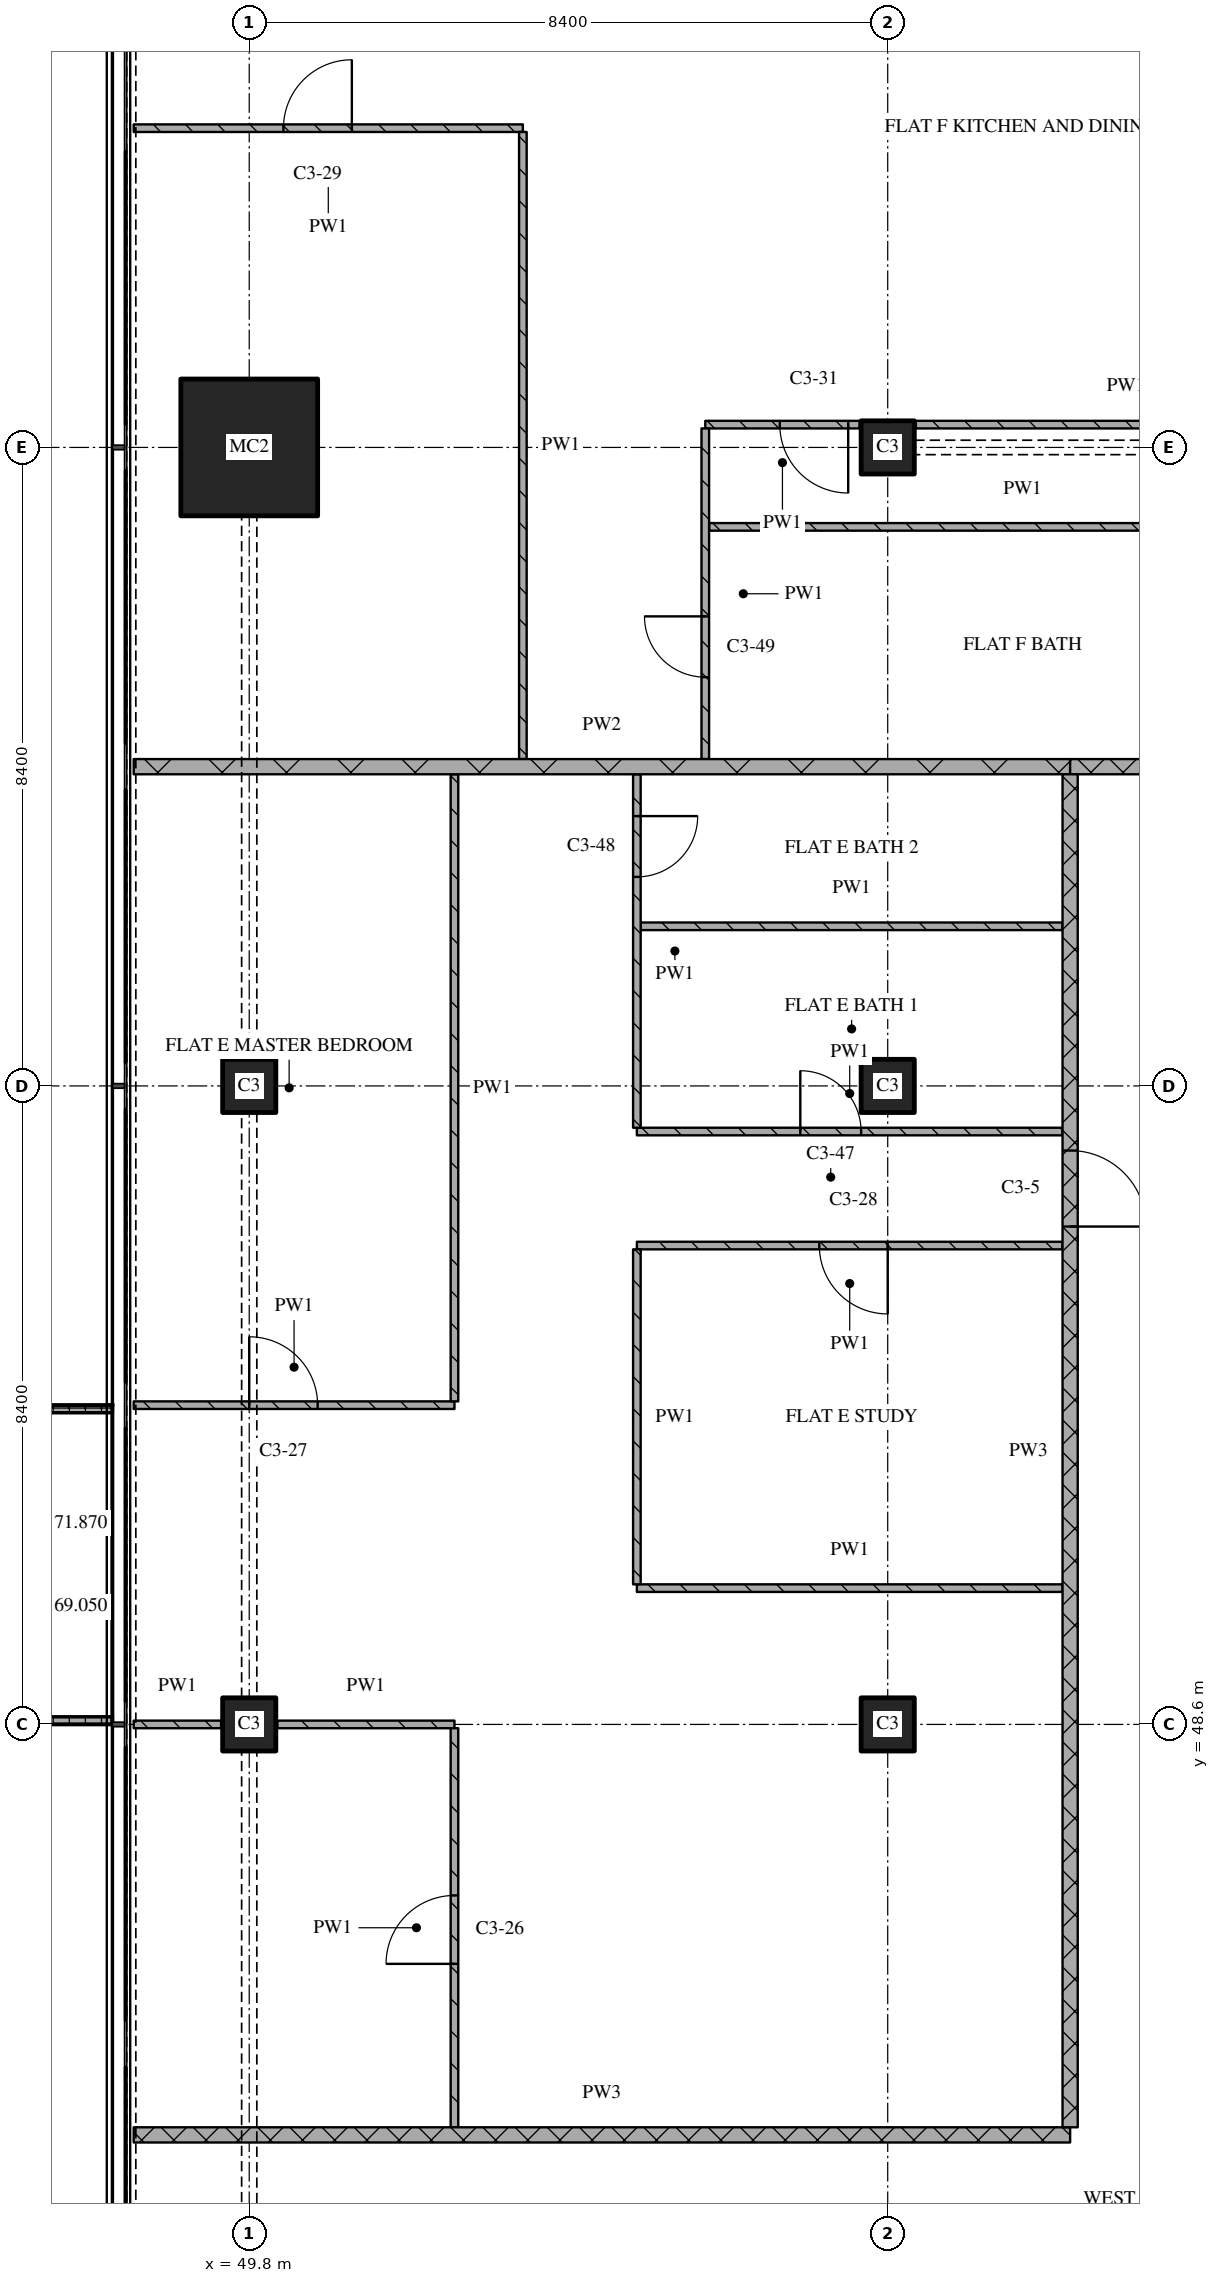
"""IFC4 building model, lengths in metres.
Left out: names, types, materials, properties, quantities, classifications, styles, units other than length and angle.
Written with IfcOpenShell. Run it as: python <this file> out.ifc"""

import sys

from ifc_helpers import new_model, si_unit, direction, frame, frame_2d, origin, origin_2d, place, context, subcontext, project, spatial, polyline, rectangle, outline, extrude, element, fill, save


model = new_model("IFC4")
c1 = context("Model", 3, precision=1e-05, world=origin(), true_north=direction((0.0, 1.0)))
c2 = subcontext(c1, "Body", "Model", "MODEL_VIEW")
j1 = project(units=[si_unit("LENGTHUNIT", "METRE"), si_unit("PLANEANGLEUNIT", "RADIAN")], contexts=[c1])
p1 = place(None, origin())
s1 = spatial("IfcSite", under=j1, at=p1, CompositionType="ELEMENT")
p2 = place(p1, origin())
s2 = spatial("IfcBuilding", under=s1, at=p2, CompositionType="ELEMENT")
p3 = place(p2, frame((0.0, 0.0, 169.05)))
s3 = spatial("IfcBuildingStorey", under=s2, at=p3, CompositionType="ELEMENT", Elevation=169.05)
for number, where, z_axis, x_axis in (
    (1, (49.8, 48.6, 0.0), (0.0, 0.0, 1.0), (1.0, 0.0, 0.0)),
    (2, (49.8, 57.0, 0.0), (0.0, 0.0, 1.0), (1.0, 0.0, 0.0)),
):
    element("IfcColumn", number, at=place(p3, frame(where, z_axis=z_axis, x_axis=x_axis)), inside=s3, PredefinedType="COLUMN", context=c2, shape_type="SweptSolid", body=[
        extrude(rectangle(XDim=0.7, YDim=0.7, at=origin_2d()), origin(), (0.0, 0.0, 1.0), 3.6),
    ])
p4 = place(p3, frame((49.8, 65.4, 0.0), z_axis=(0.0, 0.0, 1.0), x_axis=(1.0, 0.0, 0.0)))
e3 = element("IfcColumn", 3, at=p4, inside=s3, PredefinedType="COLUMN", context=c2, shape_type="SweptSolid", body=[
    extrude(rectangle(XDim=1.8, YDim=1.8, at=origin_2d()), origin(), (0.0, 0.0, 1.0), 3.6),
])
for number, where, z_axis, x_axis in (
    (4, (58.2, 48.6, 0.0), (0.0, 0.0, 1.0), (1.0, 0.0, 0.0)),
    (5, (58.2, 57.0, 0.0), (0.0, 0.0, 1.0), (1.0, 0.0, 0.0)),
    (6, (58.2, 65.4, 0.0), (0.0, 0.0, 1.0), (1.0, 0.0, 0.0)),
):
    element("IfcColumn", number, at=place(p3, frame(where, z_axis=z_axis, x_axis=x_axis)), inside=s3, PredefinedType="COLUMN", context=c2, shape_type="SweptSolid", body=[
        extrude(rectangle(XDim=0.7, YDim=0.7, at=origin_2d()), origin(), (0.0, 0.0, 1.0), 3.6),
    ])
p5 = place(p3, origin())
e7 = element("IfcWall", 7, at=p5, inside=s3, PredefinedType="SOLIDWALL", context=c2, shape_type="SweptSolid", body=[
    extrude(outline(polyline([(48.0, 52.8), (48.0, 52.7), (46.367, 52.7), (46.367, 48.7), (48.0, 48.7), (48.0, 48.6), (46.267, 48.6), (46.267, 52.8), (48.0, 52.8)])), origin(), (0.0, 0.0, 1.0), 1.0),
])
p6 = place(p3, frame((48.28, 43.2, 0.0), z_axis=(0.0, 0.0, 1.0), x_axis=(1.0, 0.0, 0.0)))
e8 = element("IfcWall", 8, at=p6, inside=s3, PredefinedType="PARTITIONING", context=c2, shape_type="SweptSolid", body=[
    extrude(rectangle(XDim=12.32, YDim=0.2, at=frame_2d((6.16, 0.0))), origin(), (0.0, 0.0, 1.0), 3.32),
])
p7 = place(p3, frame((48.28, 48.6, 0.0), z_axis=(0.0, 0.0, 1.0), x_axis=(1.0, 0.0, 0.0)))
e9 = element("IfcWall", 9, at=p7, inside=s3, PredefinedType="PARTITIONING", context=c2, shape_type="SweptSolid", body=[
    extrude(rectangle(XDim=1.15, YDim=0.1, at=frame_2d((0.575, 0.0))), origin(), (0.0, 0.0, 1.0), 3.32),
])
p8 = place(p3, frame((50.17, 48.6, 0.0), z_axis=(0.0, 0.0, 1.0), x_axis=(1.0, 0.0, 0.0)))
e10 = element("IfcWall", 10, at=p8, inside=s3, PredefinedType="PARTITIONING", context=c2, shape_type="SweptSolid", body=[
    extrude(rectangle(XDim=2.33, YDim=0.1, at=frame_2d((1.165, 0.0))), origin(), (0.0, 0.0, 1.0), 3.32),
])
p9 = place(p3, frame((54.9, 50.393, 0.0), z_axis=(0.0, 0.0, 1.0), x_axis=(1.0, 0.0, 0.0)))
e11 = element("IfcWall", 11, at=p9, inside=s3, PredefinedType="PARTITIONING", context=c2, shape_type="SweptSolid", body=[
    extrude(rectangle(XDim=5.6, YDim=0.1, at=frame_2d((2.8, 0.0))), origin(), (0.0, 0.0, 1.0), 3.32),
])
p10 = place(p3, frame((48.28, 52.8, 0.0), z_axis=(0.0, 0.0, 1.0), x_axis=(1.0, 0.0, 0.0)))
e12 = element("IfcWall", 12, at=p10, inside=s3, PredefinedType="PARTITIONING", context=c2, shape_type="SweptSolid", body=[
    extrude(rectangle(XDim=4.22, YDim=0.1, at=frame_2d((2.11, 0.0))), origin(), (0.0, 0.0, 1.0), 3.32),
])
p11 = place(p10, frame((1.52, 0.0, 0.0)))
e13 = element("IfcOpeningElement", 13, at=p11, cuts=e12, PredefinedType="OPENING", context=c2, shape_type="SweptSolid", body=[
    extrude(rectangle(XDim=0.9, YDim=2.1, at=frame_2d((0.45, 1.05))), frame((0.0, 0.06, 0.0), z_axis=(0.0, -1.0, 0.0), x_axis=(1.0, 0.0, 0.0)), (0.0, 0.0, 1.0), 0.12),
])
p12 = place(p3, frame((60.5, 54.9, 0.0), z_axis=(0.0, 0.0, 1.0), x_axis=(-1.0, 0.0, 0.0)))
e14 = element("IfcWall", 14, at=p12, inside=s3, PredefinedType="PARTITIONING", context=c2, shape_type="SweptSolid", body=[
    extrude(rectangle(XDim=5.6, YDim=0.1, at=frame_2d((2.8, 0.0))), origin(), (0.0, 0.0, 1.0), 3.32),
])
p13 = place(p12, frame((2.3, 0.0, 0.0)))
e15 = element("IfcOpeningElement", 15, at=p13, cuts=e14, PredefinedType="OPENING", context=c2, shape_type="SweptSolid", body=[
    extrude(rectangle(XDim=0.9, YDim=2.1, at=frame_2d((0.45, 1.05))), frame((0.0, 0.06, 0.0), z_axis=(0.0, -1.0, 0.0), x_axis=(1.0, 0.0, 0.0)), (0.0, 0.0, 1.0), 0.12),
])
p14 = place(p3, frame((54.9, 56.4, 0.0), z_axis=(0.0, 0.0, 1.0), x_axis=(1.0, 0.0, 0.0)))
e16 = element("IfcWall", 16, at=p14, inside=s3, PredefinedType="PARTITIONING", context=c2, shape_type="SweptSolid", body=[
    extrude(rectangle(XDim=5.6, YDim=0.1, at=frame_2d((2.8, 0.0))), origin(), (0.0, 0.0, 1.0), 3.32),
])
p15 = place(p14, frame((2.15, 0.0, 0.0)))
e17 = element("IfcOpeningElement", 17, at=p15, cuts=e16, PredefinedType="OPENING", context=c2, shape_type="SweptSolid", body=[
    extrude(rectangle(XDim=0.8, YDim=2.1, at=frame_2d((0.4, 1.05))), frame((0.0, 0.06, 0.0), z_axis=(0.0, -1.0, 0.0), x_axis=(1.0, 0.0, 0.0)), (0.0, 0.0, 1.0), 0.12),
])
p16 = place(p3, frame((54.95, 59.1, 0.0), z_axis=(0.0, 0.0, 1.0), x_axis=(1.0, 0.0, 0.0)))
e18 = element("IfcWall", 18, at=p16, inside=s3, PredefinedType="PARTITIONING", context=c2, shape_type="SweptSolid", body=[
    extrude(rectangle(XDim=5.55, YDim=0.1, at=frame_2d((2.775, 0.0))), origin(), (0.0, 0.0, 1.0), 3.32),
])
p17 = place(p3, frame((60.6, 61.2, 0.0), z_axis=(0.0, 0.0, 1.0), x_axis=(1.0, 0.0, 0.0)))
e19 = element("IfcWall", 19, at=p17, inside=s3, PredefinedType="PARTITIONING", context=c2, shape_type="SweptSolid", body=[
    extrude(rectangle(XDim=3.6, YDim=0.2, at=frame_2d((1.8, 0.0))), origin(), (0.0, 0.0, 1.0), 3.32),
])
p18 = place(p3, frame((48.28, 61.2, 0.0), z_axis=(0.0, 0.0, 1.0), x_axis=(1.0, 0.0, 0.0)))
e20 = element("IfcWall", 20, at=p18, inside=s3, PredefinedType="PARTITIONING", context=c2, shape_type="SweptSolid", body=[
    extrude(rectangle(XDim=12.32, YDim=0.2, at=frame_2d((6.16, 0.0))), origin(), (0.0, 0.0, 1.0), 3.32),
])
p19 = place(p3, frame((55.85, 64.355, 0.0), z_axis=(0.0, 0.0, 1.0), x_axis=(1.0, 0.0, 0.0)))
e21 = element("IfcWall", 21, at=p19, inside=s3, PredefinedType="PARTITIONING", context=c2, shape_type="SweptSolid", body=[
    extrude(rectangle(XDim=8.25, YDim=0.1, at=frame_2d((4.125, 0.0))), origin(), (0.0, 0.0, 1.0), 3.32),
])
p20 = place(p3, frame((57.83, 65.7, 0.0), z_axis=(0.0, 0.0, 1.0), x_axis=(-1.0, 0.0, 0.0)))
e22 = element("IfcWall", 22, at=p20, inside=s3, PredefinedType="PARTITIONING", context=c2, shape_type="SweptSolid", body=[
    extrude(rectangle(XDim=2.03, YDim=0.1, at=frame_2d((1.015, 0.0))), origin(), (0.0, 0.0, 1.0), 3.32),
])
p21 = place(p20, frame((0.15, 0.0, 0.0)))
e23 = element("IfcOpeningElement", 23, at=p21, cuts=e22, PredefinedType="OPENING", context=c2, shape_type="SweptSolid", body=[
    extrude(rectangle(XDim=0.9, YDim=2.1, at=frame_2d((0.45, 1.05))), frame((0.0, 0.06, 0.0), z_axis=(0.0, -1.0, 0.0), x_axis=(1.0, 0.0, 0.0)), (0.0, 0.0, 1.0), 0.12),
])
p22 = place(p3, frame((58.57, 65.7, 0.0), z_axis=(0.0, 0.0, 1.0), x_axis=(1.0, 0.0, 0.0)))
e24 = element("IfcWall", 24, at=p22, inside=s3, PredefinedType="PARTITIONING", context=c2, shape_type="SweptSolid", body=[
    extrude(rectangle(XDim=5.53, YDim=0.1, at=frame_2d((2.765, 0.0))), origin(), (0.0, 0.0, 1.0), 3.32),
])
p23 = place(p3, frame((53.4, 69.6, 0.0), z_axis=(0.0, 0.0, 1.0), x_axis=(-1.0, 0.0, 0.0)))
e25 = element("IfcWall", 25, at=p23, inside=s3, PredefinedType="PARTITIONING", context=c2, shape_type="SweptSolid", body=[
    extrude(rectangle(XDim=5.12, YDim=0.1, at=frame_2d((2.56, 0.0))), origin(), (0.0, 0.0, 1.0), 3.32),
])
p24 = place(p23, frame((2.25, 0.0, 0.0)))
e26 = element("IfcOpeningElement", 26, at=p24, cuts=e25, PredefinedType="OPENING", context=c2, shape_type="SweptSolid", body=[
    extrude(rectangle(XDim=0.9, YDim=2.1, at=frame_2d((0.45, 1.05))), frame((0.0, 0.06, 0.0), z_axis=(0.0, -1.0, 0.0), x_axis=(1.0, 0.0, 0.0)), (0.0, 0.0, 1.0), 0.12),
])
p25 = place(p3, frame((52.5, 43.3, 0.0), z_axis=(0.0, 0.0, 1.0), x_axis=(0.0, 1.0, 0.0)))
e27 = element("IfcWall", 27, at=p25, inside=s3, PredefinedType="PARTITIONING", context=c2, shape_type="SweptSolid", body=[
    extrude(rectangle(XDim=5.25, YDim=0.1, at=frame_2d((2.625, 0.0))), origin(), (0.0, 0.0, 1.0), 3.32),
])
p26 = place(p25, frame((2.15, 0.0, 0.0)))
e28 = element("IfcOpeningElement", 28, at=p26, cuts=e27, PredefinedType="OPENING", context=c2, shape_type="SweptSolid", body=[
    extrude(rectangle(XDim=0.9, YDim=2.1, at=frame_2d((0.45, 1.05))), frame((0.0, 0.06, 0.0), z_axis=(0.0, -1.0, 0.0), x_axis=(1.0, 0.0, 0.0)), (0.0, 0.0, 1.0), 0.12),
])
for number, where, z_axis, x_axis in (
    (29, (52.5, 61.1, 0.0), (0.0, 0.0, 1.0), (0.0, -1.0, 0.0)),
    (30, (53.4, 69.55, 0.0), (0.0, 0.0, 1.0), (0.0, -1.0, 0.0)),
):
    element("IfcWall", number, at=place(p3, frame(where, z_axis=z_axis, x_axis=x_axis)), inside=s3, PredefinedType="PARTITIONING", context=c2, shape_type="SweptSolid", body=[
        extrude(rectangle(XDim=8.25, YDim=0.1, at=frame_2d((4.125, 0.0))), origin(), (0.0, 0.0, 1.0), 3.32),
    ])
p27 = place(p3, frame((54.9, 54.85, 0.0), z_axis=(0.0, 0.0, 1.0), x_axis=(0.0, -1.0, 0.0)))
e31 = element("IfcWall", 31, at=p27, inside=s3, PredefinedType="PARTITIONING", context=c2, shape_type="SweptSolid", body=[
    extrude(rectangle(XDim=4.407, YDim=0.1, at=frame_2d((2.204, 0.0))), origin(), (0.0, 0.0, 1.0), 3.32),
])
p28 = place(p3, frame((54.9, 61.1, 0.0), z_axis=(0.0, 0.0, 1.0), x_axis=(0.0, -1.0, 0.0)))
e32 = element("IfcWall", 32, at=p28, inside=s3, PredefinedType="PARTITIONING", context=c2, shape_type="SweptSolid", body=[
    extrude(rectangle(XDim=4.65, YDim=0.1, at=frame_2d((2.325, 0.0))), origin(), (0.0, 0.0, 1.0), 3.32),
])
p29 = place(p28, frame((0.55, 0.0, 0.0)))
e33 = element("IfcOpeningElement", 33, at=p29, cuts=e32, PredefinedType="OPENING", context=c2, shape_type="SweptSolid", body=[
    extrude(rectangle(XDim=0.8, YDim=2.1, at=frame_2d((0.4, 1.05))), frame((0.0, 0.06, 0.0), z_axis=(0.0, -1.0, 0.0), x_axis=(1.0, 0.0, 0.0)), (0.0, 0.0, 1.0), 0.12),
])
p30 = place(p3, frame((55.8, 65.65, 0.0), z_axis=(0.0, 0.0, 1.0), x_axis=(0.0, -1.0, 0.0)))
e34 = element("IfcWall", 34, at=p30, inside=s3, PredefinedType="PARTITIONING", context=c2, shape_type="SweptSolid", body=[
    extrude(rectangle(XDim=4.35, YDim=0.1, at=frame_2d((2.175, 0.0))), origin(), (0.0, 0.0, 1.0), 3.32),
])
p31 = place(p30, frame((2.473, 0.0, 0.0)))
e35 = element("IfcOpeningElement", 35, at=p31, cuts=e34, PredefinedType="OPENING", context=c2, shape_type="SweptSolid", body=[
    extrude(rectangle(XDim=0.8, YDim=2.1, at=frame_2d((0.4, 1.05))), frame((0.0, 0.06, 0.0), z_axis=(0.0, -1.0, 0.0), x_axis=(1.0, 0.0, 0.0)), (0.0, 0.0, 1.0), 0.12),
])
p32 = place(p3, frame((60.6, 43.3, 0.0), z_axis=(0.0, 0.0, 1.0), x_axis=(0.0, 1.0, 0.0)))
e36 = element("IfcWall", 36, at=p32, inside=s3, PredefinedType="PARTITIONING", context=c2, shape_type="SweptSolid", body=[
    extrude(rectangle(XDim=17.8, YDim=0.2, at=frame_2d((8.9, 0.0))), origin(), (0.0, 0.0, 1.0), 3.32),
])
p33 = place(p32, frame((11.85, 0.0, 0.0)))
e37 = element("IfcOpeningElement", 37, at=p33, cuts=e36, PredefinedType="OPENING", context=c2, shape_type="SweptSolid", body=[
    extrude(rectangle(XDim=1.0, YDim=2.1, at=frame_2d((0.5, 1.05))), frame((0.0, 0.11, 0.0), z_axis=(0.0, -1.0, 0.0), x_axis=(1.0, 0.0, 0.0)), (0.0, 0.0, 1.0), 0.22),
])
p34 = place(p11, origin())
e38 = element("IfcDoor", 38, at=p34, inside=s3, OperationType="SINGLE_SWING_LEFT", PredefinedType="DOOR", context=c2, shape_type="SweptSolid", body=[
    extrude(rectangle(XDim=0.9, YDim=2.1, at=frame_2d((0.45, 1.05))), frame((0.0, 0.025, 0.0), z_axis=(0.0, -1.0, 0.0), x_axis=(1.0, 0.0, 0.0)), (0.0, 0.0, 1.0), 0.05),
])
fill(e13, e38)
p35 = place(p13, origin())
e39 = element("IfcDoor", 39, at=p35, inside=s3, OperationType="SINGLE_SWING_LEFT", PredefinedType="DOOR", context=c2, shape_type="SweptSolid", body=[
    extrude(rectangle(XDim=0.9, YDim=2.1, at=frame_2d((0.45, 1.05))), frame((0.0, 0.025, 0.0), z_axis=(0.0, -1.0, 0.0), x_axis=(1.0, 0.0, 0.0)), (0.0, 0.0, 1.0), 0.05),
])
fill(e15, e39)
p36 = place(p15, origin())
e40 = element("IfcDoor", 40, at=p36, inside=s3, OperationType="SINGLE_SWING_LEFT", PredefinedType="DOOR", context=c2, shape_type="SweptSolid", body=[
    extrude(rectangle(XDim=0.8, YDim=2.1, at=frame_2d((0.4, 1.05))), frame((0.0, 0.025, 0.0), z_axis=(0.0, -1.0, 0.0), x_axis=(1.0, 0.0, 0.0)), (0.0, 0.0, 1.0), 0.05),
])
fill(e17, e40)
p37 = place(p21, origin())
e41 = element("IfcDoor", 41, at=p37, inside=s3, OperationType="SINGLE_SWING_LEFT", PredefinedType="DOOR", context=c2, shape_type="SweptSolid", body=[
    extrude(rectangle(XDim=0.9, YDim=2.1, at=frame_2d((0.45, 1.05))), frame((0.0, 0.025, 0.0), z_axis=(0.0, -1.0, 0.0), x_axis=(1.0, 0.0, 0.0)), (0.0, 0.0, 1.0), 0.05),
])
fill(e23, e41)
p38 = place(p24, origin())
e42 = element("IfcDoor", 42, at=p38, inside=s3, OperationType="SINGLE_SWING_RIGHT", PredefinedType="DOOR", context=c2, shape_type="SweptSolid", body=[
    extrude(rectangle(XDim=0.9, YDim=2.1, at=frame_2d((0.45, 1.05))), frame((0.0, 0.025, 0.0), z_axis=(0.0, -1.0, 0.0), x_axis=(1.0, 0.0, 0.0)), (0.0, 0.0, 1.0), 0.05),
])
fill(e26, e42)
p39 = place(p26, origin())
e43 = element("IfcDoor", 43, at=p39, inside=s3, OperationType="SINGLE_SWING_LEFT", PredefinedType="DOOR", context=c2, shape_type="SweptSolid", body=[
    extrude(rectangle(XDim=0.9, YDim=2.1, at=frame_2d((0.45, 1.05))), frame((0.0, 0.025, 0.0), z_axis=(0.0, -1.0, 0.0), x_axis=(1.0, 0.0, 0.0)), (0.0, 0.0, 1.0), 0.05),
])
fill(e28, e43)
p40 = place(p29, origin())
e44 = element("IfcDoor", 44, at=p40, inside=s3, OperationType="SINGLE_SWING_LEFT", PredefinedType="DOOR", context=c2, shape_type="SweptSolid", body=[
    extrude(rectangle(XDim=0.8, YDim=2.1, at=frame_2d((0.4, 1.05))), frame((0.0, 0.025, 0.0), z_axis=(0.0, -1.0, 0.0), x_axis=(1.0, 0.0, 0.0)), (0.0, 0.0, 1.0), 0.05),
])
fill(e33, e44)
p41 = place(p31, origin())
e45 = element("IfcDoor", 45, at=p41, inside=s3, OperationType="SINGLE_SWING_RIGHT", PredefinedType="DOOR", context=c2, shape_type="SweptSolid", body=[
    extrude(rectangle(XDim=0.8, YDim=2.1, at=frame_2d((0.4, 1.05))), frame((0.0, 0.025, 0.0), z_axis=(0.0, -1.0, 0.0), x_axis=(1.0, 0.0, 0.0)), (0.0, 0.0, 1.0), 0.05),
])
fill(e35, e45)
p42 = place(p33, origin())
e46 = element("IfcDoor", 46, at=p42, inside=s3, OperationType="SINGLE_SWING_RIGHT", PredefinedType="DOOR", context=c2, shape_type="SweptSolid", body=[
    extrude(rectangle(XDim=1.0, YDim=2.1, at=frame_2d((0.5, 1.05))), frame((0.0, 0.025, 0.0), z_axis=(0.0, -1.0, 0.0), x_axis=(1.0, 0.0, 0.0)), (0.0, 0.0, 1.0), 0.05),
])
fill(e37, e46)
save(model, sys.argv[1])
